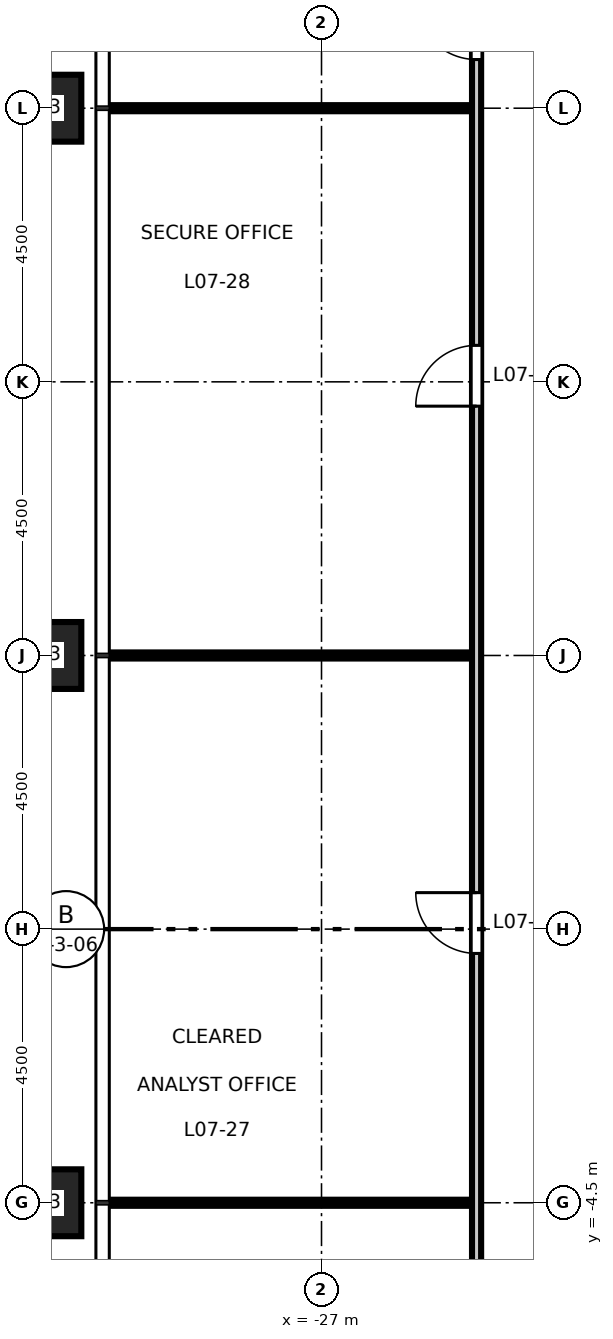
"""IFC4 building model, lengths in metres.
Left out: names, types, materials, properties, quantities, classifications, styles, units other than length and angle.
Written with IfcOpenShell. Run it as: python <this file> out.ifc"""

import sys

from ifc_helpers import new_model, si_unit, direction, frame, frame_2d, origin, origin_2d, place, context, subcontext, project, spatial, rectangle, hollow_rectangle, extrude, element, fill, save


model = new_model("IFC4")
c1 = context("Model", 3, precision=1e-05, world=origin(), true_north=direction((0.0, 1.0)))
c2 = subcontext(c1, "Body", "Model", "MODEL_VIEW")
j1 = project(units=[si_unit("LENGTHUNIT", "METRE"), si_unit("PLANEANGLEUNIT", "RADIAN")], contexts=[c1])
p1 = place(None, origin())
s1 = spatial("IfcSite", under=j1, at=p1, CompositionType="ELEMENT")
p2 = place(p1, origin())
s2 = spatial("IfcBuilding", under=s1, at=p2, CompositionType="ELEMENT")
p3 = place(p2, frame((0.0, 0.0, 35.7)))
s3 = spatial("IfcBuildingStorey", under=s2, at=p3, CompositionType="ELEMENT", Elevation=35.7)
for number, where, z_axis, x_axis in (
    (1, (-31.5, 13.5, 0.0), (0.0, 0.0, 1.0), (1.0, 0.0, 0.0)),
    (2, (-31.5, 4.5, 0.0), (0.0, 0.0, 1.0), (1.0, 0.0, 0.0)),
    (3, (-31.5, -4.5, 0.0), (0.0, 0.0, 1.0), (1.0, 0.0, 0.0)),
):
    element("IfcColumn", number, at=place(p3, frame(where, z_axis=z_axis, x_axis=x_axis)), inside=s3, PredefinedType="COLUMN", context=c2, shape_type="SweptSolid", body=[
        extrude(hollow_rectangle(XDim=1.1, YDim=1.1, WallThickness=0.07, at=origin_2d()), origin(), (0.0, 0.0, 1.0), 4.5),
    ])
for number, where, z_axis, x_axis in (
    (4, (-30.51, -4.5, 0.0), (0.0, 0.0, 1.0), (1.0, 0.0, 0.0)),
    (5, (-30.51, 4.5, 0.0), (0.0, 0.0, 1.0), (1.0, 0.0, 0.0)),
):
    element("IfcWall", number, at=place(p3, frame(where, z_axis=z_axis, x_axis=x_axis)), inside=s3, PredefinedType="PARTITIONING", context=c2, shape_type="SweptSolid", body=[
        extrude(rectangle(XDim=5.985, YDim=0.1, at=frame_2d((2.993, 0.0))), origin(), (0.0, 0.0, 1.0), 4.35),
    ])
p4 = place(p3, frame((-30.51, 13.5, 0.0), z_axis=(0.0, 0.0, 1.0), x_axis=(1.0, 0.0, 0.0)))
e6 = element("IfcWall", 6, at=p4, inside=s3, PredefinedType="PARTITIONING", context=c2, shape_type="SweptSolid", body=[
    extrude(rectangle(XDim=5.985, YDim=0.1, at=frame_2d((2.993, 0.0))), origin(), (0.0, 0.0, 1.0), 3.35),
])
p5 = place(p3, frame((-24.45, -16.125, 0.0), z_axis=(0.0, 0.0, 1.0), x_axis=(0.0, 1.0, 0.0)))
e7 = element("IfcWall", 7, at=p5, inside=s3, PredefinedType="PARTITIONING", context=c2, shape_type="SweptSolid", body=[
    extrude(rectangle(XDim=32.25, YDim=0.15, at=frame_2d((16.125, 0.0))), origin(), (0.0, 0.0, 1.0), 4.35),
])
p6 = place(p5, frame((30.425, 0.0, 0.0)))
e8 = element("IfcOpeningElement", 8, at=p6, cuts=e7, PredefinedType="OPENING", context=c2, shape_type="SweptSolid", body=[
    extrude(rectangle(XDim=1.0, YDim=2.1, at=frame_2d((0.5, 1.05))), frame((0.0, 0.085, 0.0), z_axis=(0.0, -1.0, 0.0), x_axis=(1.0, 0.0, 0.0)), (0.0, 0.0, 1.0), 0.17),
])
p7 = place(p5, frame((0.725, 0.0, 0.0)))
e9 = element("IfcOpeningElement", 9, at=p7, cuts=e7, PredefinedType="OPENING", context=c2, shape_type="SweptSolid", body=[
    extrude(rectangle(XDim=1.0, YDim=2.1, at=frame_2d((0.5, 1.05))), frame((0.0, 0.085, 0.0), z_axis=(0.0, -1.0, 0.0), x_axis=(1.0, 0.0, 0.0)), (0.0, 0.0, 1.0), 0.17),
])
p8 = place(p5, frame((6.725, 0.0, 0.0)))
e10 = element("IfcOpeningElement", 10, at=p8, cuts=e7, PredefinedType="OPENING", context=c2, shape_type="SweptSolid", body=[
    extrude(rectangle(XDim=1.0, YDim=2.1, at=frame_2d((0.5, 1.05))), frame((0.0, 0.085, 0.0), z_axis=(0.0, -1.0, 0.0), x_axis=(1.0, 0.0, 0.0)), (0.0, 0.0, 1.0), 0.17),
])
p9 = place(p5, frame((15.725, 0.0, 0.0)))
e11 = element("IfcOpeningElement", 11, at=p9, cuts=e7, PredefinedType="OPENING", context=c2, shape_type="SweptSolid", body=[
    extrude(rectangle(XDim=1.0, YDim=2.1, at=frame_2d((0.5, 1.05))), frame((0.0, 0.085, 0.0), z_axis=(0.0, -1.0, 0.0), x_axis=(1.0, 0.0, 0.0)), (0.0, 0.0, 1.0), 0.17),
])
p10 = place(p5, frame((24.725, 0.0, 0.0)))
e12 = element("IfcOpeningElement", 12, at=p10, cuts=e7, PredefinedType="OPENING", context=c2, shape_type="SweptSolid", body=[
    extrude(rectangle(XDim=1.0, YDim=2.1, at=frame_2d((0.5, 1.05))), frame((0.0, 0.085, 0.0), z_axis=(0.0, -1.0, 0.0), x_axis=(1.0, 0.0, 0.0)), (0.0, 0.0, 1.0), 0.17),
])
p11 = place(p6, origin())
e13 = element("IfcDoor", 13, at=p11, inside=s3, OperationType="SINGLE_SWING_RIGHT", PredefinedType="DOOR", context=c2, shape_type="SweptSolid", body=[
    extrude(rectangle(XDim=1.0, YDim=2.1, at=frame_2d((0.5, 1.05))), frame((0.0, 0.025, 0.0), z_axis=(0.0, -1.0, 0.0), x_axis=(1.0, 0.0, 0.0)), (0.0, 0.0, 1.0), 0.05),
])
fill(e8, e13)
p12 = place(p9, origin())
e14 = element("IfcDoor", 14, at=p12, inside=s3, OperationType="SINGLE_SWING_RIGHT", PredefinedType="DOOR", context=c2, shape_type="SweptSolid", body=[
    extrude(rectangle(XDim=1.0, YDim=2.1, at=frame_2d((0.5, 1.05))), frame((0.0, 0.025, 0.0), z_axis=(0.0, -1.0, 0.0), x_axis=(1.0, 0.0, 0.0)), (0.0, 0.0, 1.0), 0.05),
])
fill(e11, e14)
p13 = place(p10, origin())
e15 = element("IfcDoor", 15, at=p13, inside=s3, OperationType="SINGLE_SWING_LEFT", PredefinedType="DOOR", context=c2, shape_type="SweptSolid", body=[
    extrude(rectangle(XDim=1.0, YDim=2.1, at=frame_2d((0.5, 1.05))), frame((0.0, 0.025, 0.0), z_axis=(0.0, -1.0, 0.0), x_axis=(1.0, 0.0, 0.0)), (0.0, 0.0, 1.0), 0.05),
])
fill(e12, e15)
save(model, sys.argv[1])
